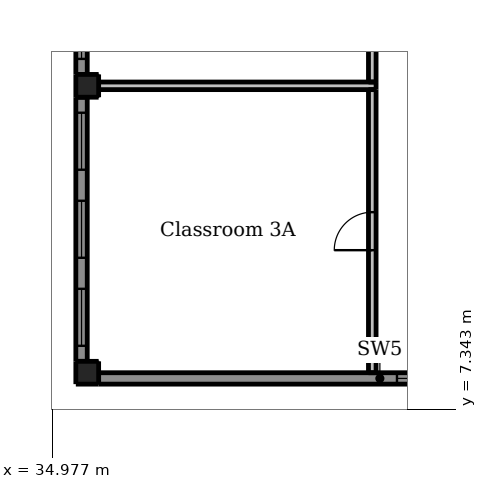
"""IFC4 building model, lengths in metres.
Left out: names, types, materials, properties, quantities, classifications, styles, units other than length and angle.
Written with IfcOpenShell. Run it as: python <this file> out.ifc"""

import sys

from ifc_helpers import new_model, si_unit, direction, frame, frame_2d, origin, origin_2d, place, context, subcontext, project, spatial, rectangle, extrude, element, fill, save


model = new_model("IFC4")
c1 = context("Model", 3, precision=1e-05, world=origin(), true_north=direction((0.0, 1.0)))
c2 = subcontext(c1, "Body", "Model", "MODEL_VIEW")
j1 = project(units=[si_unit("LENGTHUNIT", "METRE"), si_unit("PLANEANGLEUNIT", "RADIAN")], contexts=[c1])
p1 = place(None, origin())
s1 = spatial("IfcSite", under=j1, at=p1, CompositionType="ELEMENT")
p2 = place(p1, origin())
s2 = spatial("IfcBuilding", under=s1, at=p2, CompositionType="ELEMENT")
p3 = place(p2, frame((0.0, 0.0, 14.5)))
s3 = spatial("IfcBuildingStorey", under=s2, at=p3, CompositionType="ELEMENT", Elevation=14.5)
for number, where, z_axis, x_axis in (
    (1, (35.9, 8.3, -0.3), (0.0, 0.0, 1.0), (1.0, 0.0, 0.0)),
    (2, (35.9, 15.85, -0.3), (0.0, 0.0, 1.0), (1.0, 0.0, 0.0)),
):
    element("IfcColumn", number, at=place(p3, frame(where, z_axis=z_axis, x_axis=x_axis)), inside=s3, PredefinedType="COLUMN", context=c2, shape_type="SweptSolid", body=[
        extrude(rectangle(XDim=0.6, YDim=0.6, at=origin_2d()), origin(), (0.0, 0.0, 1.0), 4.5),
    ])
p4 = place(p3, frame((35.75, 8.6, 0.0), z_axis=(0.0, 0.0, 1.0), x_axis=(0.0, 1.0, 0.0)))
e3 = element("IfcWall", 3, at=p4, inside=s3, PredefinedType="SOLIDWALL", context=c2, shape_type="SweptSolid", body=[
    extrude(rectangle(XDim=6.95, YDim=0.3, at=frame_2d((3.475, 0.0))), origin(), (0.0, 0.0, 1.0), 3.3),
])
p5 = place(p4, frame((0.408, 0.0, 0.9)))
e4 = element("IfcOpeningElement", 4, at=p5, cuts=e3, PredefinedType="OPENING", context=c2, shape_type="SweptSolid", body=[
    extrude(rectangle(XDim=1.5, YDim=1.5, at=frame_2d((0.75, 0.75))), frame((0.0, 0.16, 0.0), z_axis=(0.0, -1.0, 0.0), x_axis=(1.0, 0.0, 0.0)), (0.0, 0.0, 1.0), 0.32),
])
p6 = place(p4, frame((2.725, 0.0, 0.9)))
e5 = element("IfcOpeningElement", 5, at=p6, cuts=e3, PredefinedType="OPENING", context=c2, shape_type="SweptSolid", body=[
    extrude(rectangle(XDim=1.5, YDim=1.5, at=frame_2d((0.75, 0.75))), frame((0.0, 0.16, 0.0), z_axis=(0.0, -1.0, 0.0), x_axis=(1.0, 0.0, 0.0)), (0.0, 0.0, 1.0), 0.32),
])
p7 = place(p4, frame((5.042, 0.0, 0.9)))
e6 = element("IfcOpeningElement", 6, at=p7, cuts=e3, PredefinedType="OPENING", context=c2, shape_type="SweptSolid", body=[
    extrude(rectangle(XDim=1.5, YDim=1.5, at=frame_2d((0.75, 0.75))), frame((0.0, 0.16, 0.0), z_axis=(0.0, -1.0, 0.0), x_axis=(1.0, 0.0, 0.0)), (0.0, 0.0, 1.0), 0.32),
])
p8 = place(p3, frame((35.75, 16.15, 0.0), z_axis=(0.0, 0.0, 1.0), x_axis=(0.0, 1.0, 0.0)))
e7 = element("IfcWall", 7, at=p8, inside=s3, PredefinedType="SOLIDWALL", context=c2, shape_type="SweptSolid", body=[
    extrude(rectangle(XDim=6.95, YDim=0.3, at=frame_2d((3.475, 0.0))), origin(), (0.0, 0.0, 1.0), 3.3),
])
p9 = place(p8, frame((0.408, 0.0, 0.9)))
e8 = element("IfcOpeningElement", 8, at=p9, cuts=e7, PredefinedType="OPENING", context=c2, shape_type="SweptSolid", body=[
    extrude(rectangle(XDim=1.5, YDim=1.5, at=frame_2d((0.75, 0.75))), frame((0.0, 0.16, 0.0), z_axis=(0.0, -1.0, 0.0), x_axis=(1.0, 0.0, 0.0)), (0.0, 0.0, 1.0), 0.32),
])
p10 = place(p8, frame((2.725, 0.0, 0.9)))
e9 = element("IfcOpeningElement", 9, at=p10, cuts=e7, PredefinedType="OPENING", context=c2, shape_type="SweptSolid", body=[
    extrude(rectangle(XDim=1.5, YDim=1.5, at=frame_2d((0.75, 0.75))), frame((0.0, 0.16, 0.0), z_axis=(0.0, -1.0, 0.0), x_axis=(1.0, 0.0, 0.0)), (0.0, 0.0, 1.0), 0.32),
])
p11 = place(p8, frame((5.042, 0.0, 0.9)))
e10 = element("IfcOpeningElement", 10, at=p11, cuts=e7, PredefinedType="OPENING", context=c2, shape_type="SweptSolid", body=[
    extrude(rectangle(XDim=1.5, YDim=1.5, at=frame_2d((0.75, 0.75))), frame((0.0, 0.16, 0.0), z_axis=(0.0, -1.0, 0.0), x_axis=(1.0, 0.0, 0.0)), (0.0, 0.0, 1.0), 0.32),
])
p12 = place(p3, frame((36.2, 8.15, 0.0), z_axis=(0.0, 0.0, 1.0), x_axis=(1.0, 0.0, 0.0)))
e11 = element("IfcWall", 11, at=p12, inside=s3, PredefinedType="SOLIDWALL", context=c2, shape_type="SweptSolid", body=[
    extrude(rectangle(XDim=14.8, YDim=0.3, at=frame_2d((7.4, 0.0))), origin(), (0.0, 0.0, 1.0), 3.1),
])
p13 = place(p12, frame((7.85, 0.0, 0.9)))
e12 = element("IfcOpeningElement", 12, at=p13, cuts=e11, PredefinedType="OPENING", context=c2, shape_type="SweptSolid", body=[
    extrude(rectangle(XDim=1.5, YDim=1.5, at=frame_2d((0.75, 0.75))), frame((0.0, 0.16, 0.0), z_axis=(0.0, -1.0, 0.0), x_axis=(1.0, 0.0, 0.0)), (0.0, 0.0, 1.0), 0.32),
])
p14 = place(p3, frame((43.4, 8.3, 0.0), z_axis=(0.0, 0.0, 1.0), x_axis=(0.0, 1.0, 0.0)))
e13 = element("IfcWall", 13, at=p14, inside=s3, PredefinedType="PARTITIONING", context=c2, shape_type="SweptSolid", body=[
    extrude(rectangle(XDim=7.45, YDim=0.2, at=frame_2d((3.725, 0.0))), origin(), (0.0, 0.0, 1.0), 3.1),
])
p15 = place(p14, frame((3.225, 0.0, 0.0)))
e14 = element("IfcOpeningElement", 14, at=p15, cuts=e13, PredefinedType="OPENING", context=c2, shape_type="SweptSolid", body=[
    extrude(rectangle(XDim=1.0, YDim=2.1, at=frame_2d((0.5, 1.05))), frame((0.0, 0.11, 0.0), z_axis=(0.0, -1.0, 0.0), x_axis=(1.0, 0.0, 0.0)), (0.0, 0.0, 1.0), 0.22),
])
p16 = place(p3, frame((43.4, 15.95, 0.0), z_axis=(0.0, 0.0, 1.0), x_axis=(0.0, 1.0, 0.0)))
e15 = element("IfcWall", 15, at=p16, inside=s3, PredefinedType="PARTITIONING", context=c2, shape_type="SweptSolid", body=[
    extrude(rectangle(XDim=7.35, YDim=0.2, at=frame_2d((3.675, 0.0))), origin(), (0.0, 0.0, 1.0), 3.1),
])
p17 = place(p16, frame((3.175, 0.0, 0.0)))
e16 = element("IfcOpeningElement", 16, at=p17, cuts=e15, PredefinedType="OPENING", context=c2, shape_type="SweptSolid", body=[
    extrude(rectangle(XDim=1.0, YDim=2.1, at=frame_2d((0.5, 1.05))), frame((0.0, 0.11, 0.0), z_axis=(0.0, -1.0, 0.0), x_axis=(1.0, 0.0, 0.0)), (0.0, 0.0, 1.0), 0.22),
])
p18 = place(p3, frame((36.2, 15.85, 0.0), z_axis=(0.0, 0.0, 1.0), x_axis=(1.0, 0.0, 0.0)))
e17 = element("IfcWall", 17, at=p18, inside=s3, PredefinedType="PARTITIONING", context=c2, shape_type="SweptSolid", body=[
    extrude(rectangle(XDim=7.3, YDim=0.2, at=frame_2d((3.65, 0.0))), origin(), (0.0, 0.0, 1.0), 3.1),
])
p19 = place(p5, origin())
e18 = element("IfcWindow", 18, at=p19, inside=s3, PartitioningType="DOUBLE_PANEL_HORIZONTAL", PredefinedType="WINDOW", context=c2, shape_type="SweptSolid", body=[
    extrude(rectangle(XDim=1.5, YDim=1.5, at=frame_2d((0.75, 0.75))), frame((0.0, 0.03, 0.0), z_axis=(0.0, -1.0, 0.0), x_axis=(1.0, 0.0, 0.0)), (0.0, 0.0, 1.0), 0.06),
])
fill(e4, e18)
p20 = place(p6, origin())
e19 = element("IfcWindow", 19, at=p20, inside=s3, PartitioningType="DOUBLE_PANEL_HORIZONTAL", PredefinedType="WINDOW", context=c2, shape_type="SweptSolid", body=[
    extrude(rectangle(XDim=1.5, YDim=1.5, at=frame_2d((0.75, 0.75))), frame((0.0, 0.03, 0.0), z_axis=(0.0, -1.0, 0.0), x_axis=(1.0, 0.0, 0.0)), (0.0, 0.0, 1.0), 0.06),
])
fill(e5, e19)
p21 = place(p7, origin())
e20 = element("IfcWindow", 20, at=p21, inside=s3, PartitioningType="DOUBLE_PANEL_HORIZONTAL", PredefinedType="WINDOW", context=c2, shape_type="SweptSolid", body=[
    extrude(rectangle(XDim=1.5, YDim=1.5, at=frame_2d((0.75, 0.75))), frame((0.0, 0.03, 0.0), z_axis=(0.0, -1.0, 0.0), x_axis=(1.0, 0.0, 0.0)), (0.0, 0.0, 1.0), 0.06),
])
fill(e6, e20)
p22 = place(p9, origin())
e21 = element("IfcWindow", 21, at=p22, inside=s3, PartitioningType="DOUBLE_PANEL_HORIZONTAL", PredefinedType="WINDOW", context=c2, shape_type="SweptSolid", body=[
    extrude(rectangle(XDim=1.5, YDim=1.5, at=frame_2d((0.75, 0.75))), frame((0.0, 0.03, 0.0), z_axis=(0.0, -1.0, 0.0), x_axis=(1.0, 0.0, 0.0)), (0.0, 0.0, 1.0), 0.06),
])
fill(e8, e21)
p23 = place(p13, origin())
e22 = element("IfcWindow", 22, at=p23, inside=s3, PartitioningType="DOUBLE_PANEL_HORIZONTAL", PredefinedType="WINDOW", context=c2, shape_type="SweptSolid", body=[
    extrude(rectangle(XDim=1.5, YDim=1.5, at=frame_2d((0.75, 0.75))), frame((0.0, 0.03, 0.0), z_axis=(0.0, -1.0, 0.0), x_axis=(1.0, 0.0, 0.0)), (0.0, 0.0, 1.0), 0.06),
])
fill(e12, e22)
p24 = place(p15, origin())
e23 = element("IfcDoor", 23, at=p24, inside=s3, OperationType="SINGLE_SWING_LEFT", PredefinedType="DOOR", context=c2, shape_type="SweptSolid", body=[
    extrude(rectangle(XDim=1.0, YDim=2.1, at=frame_2d((0.5, 1.05))), frame((0.0, 0.025, 0.0), z_axis=(0.0, -1.0, 0.0), x_axis=(1.0, 0.0, 0.0)), (0.0, 0.0, 1.0), 0.05),
])
fill(e14, e23)
save(model, sys.argv[1])
